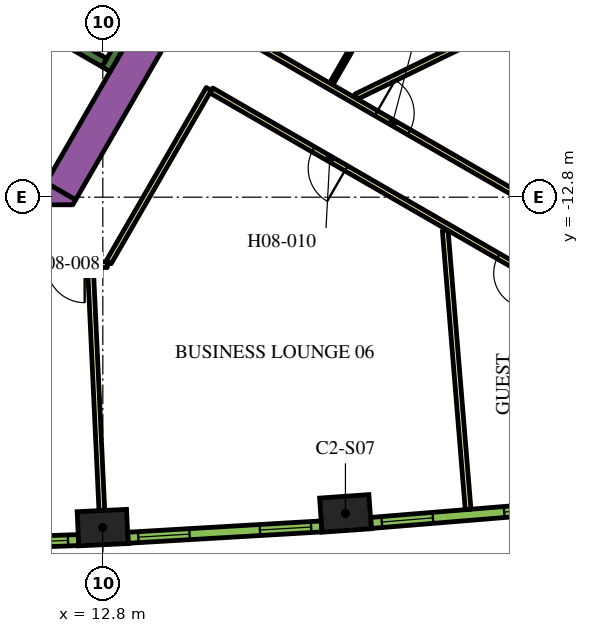
"""IFC4 building model, lengths in metres.
Left out: names, types, materials, properties, quantities, classifications, styles, units other than length and angle.
Written with IfcOpenShell. Run it as: python <this file> out.ifc"""

import sys

from ifc_helpers import new_model, si_unit, direction, frame, frame_2d, origin, origin_2d, place, context, subcontext, project, spatial, polyline, rectangle, outline, extrude, element, fill, save


model = new_model("IFC4")
c1 = context("Model", 3, precision=1e-05, world=origin(), true_north=direction((0.0, 1.0)))
c2 = subcontext(c1, "Body", "Model", "MODEL_VIEW")
j1 = project(units=[si_unit("LENGTHUNIT", "METRE"), si_unit("PLANEANGLEUNIT", "RADIAN")], contexts=[c1])
p1 = place(None, origin())
s1 = spatial("IfcSite", under=j1, at=p1, CompositionType="ELEMENT")
p2 = place(p1, origin())
s2 = spatial("IfcBuilding", under=s1, at=p2, CompositionType="ELEMENT")
p3 = place(p2, frame((0.0, 0.0, 111.0)))
s3 = spatial("IfcBuildingStorey", under=s2, at=p3, CompositionType="ELEMENT", Elevation=111.0)
for number, where, z_axis, x_axis in (
    (1, (12.795, -21.494, 0.0), (0.0, 0.0, 1.0), (0.999, 0.047, 0.0)),
    (2, (19.184, -21.12, 0.0), (0.0, 0.0, 1.0), (0.998, 0.07, 0.0)),
):
    element("IfcColumn", number, at=place(p3, frame(where, z_axis=z_axis, x_axis=x_axis)), inside=s3, PredefinedType="COLUMN", context=c2, shape_type="SweptSolid", body=[
        extrude(rectangle(XDim=1.3, YDim=0.9, at=origin_2d()), origin(), (0.0, 0.0, 1.0), 3.9),
    ])
p4 = place(p3, frame((11.695, -12.644, 0.0), z_axis=(0.0, 0.0, 1.0), x_axis=(0.500010229568, 0.86601949766, 0.0)))
e3 = element("IfcWall", 3, at=p4, inside=s3, PredefinedType="SOLIDWALL", context=c2, shape_type="SweptSolid", body=[
    extrude(rectangle(XDim=9.326, YDim=0.9, at=frame_2d((4.663, 0.0))), origin(), (0.0, 0.0, 1.0), 3.9),
])
p5 = place(p3, origin())
e4 = element("IfcWall", 4, at=p5, inside=s3, PredefinedType="SOLIDWALL", context=c2, shape_type="SweptSolid", body=[
    extrude(outline(polyline([(12.009, -13.0), (11.312, -13.0), (11.312, -12.425), (12.083, -12.871), (12.009, -13.0)])), origin(), (0.0, 0.0, 1.0), 3.9),
])
e5 = element("IfcWall", 5, at=p5, inside=s3, PredefinedType="SOLIDWALL", context=c2, shape_type="SweptSolid", body=[
    extrude(outline(polyline([(11.489, -12.1), (11.312, -12.407), (11.312, -12.1), (11.489, -12.1)])), origin(), (0.0, 0.0, 1.0), 3.9),
])
p6 = place(p3, frame((12.885, -9.431, 0.0), z_axis=(0.0, 0.0, 1.0), x_axis=(0.500020560727, 0.866013532718, 0.0)))
e6 = element("IfcWall", 6, at=p6, inside=s3, PredefinedType="SOLIDWALL", context=c2, shape_type="SweptSolid", body=[
    extrude(rectangle(XDim=3.45, YDim=0.25, at=frame_2d((1.725, 0.0))), origin(), (0.0, 0.0, 1.0), 3.9),
])
p7 = place(p3, frame((12.84, -9.261, 0.0), z_axis=(0.0, 0.0, 1.0), x_axis=(-0.866013990052, 0.500019768644, 0.0)))
e7 = element("IfcWall", 7, at=p7, inside=s3, PredefinedType="SOLIDWALL", context=c2, shape_type="SweptSolid", body=[
    extrude(rectangle(XDim=6.8, YDim=0.25, at=frame_2d((3.4, 0.0))), origin(), (0.0, 0.0, 1.0), 3.9),
])
p8 = place(p3, frame((16.412, -8.523, 0.0), z_axis=(0.0, 0.0, 1.0), x_axis=(0.866025629663, -0.499999608766, 0.0)))
e8 = element("IfcWall", 8, at=p8, inside=s3, PredefinedType="PARTITIONING", context=c2, shape_type="SweptSolid", body=[
    extrude(rectangle(XDim=13.624, YDim=0.15, at=frame_2d((6.812, 0.0))), origin(), (0.0, 0.0, 1.0), 2.75),
])
p9 = place(p8, frame((4.134, 0.0, 0.0)))
e9 = element("IfcOpeningElement", 9, at=p9, cuts=e8, PredefinedType="OPENING", context=c2, shape_type="SweptSolid", body=[
    extrude(rectangle(XDim=1.0, YDim=2.1, at=frame_2d((0.5, 1.05))), frame((0.0, 0.085, 0.0), z_axis=(0.0, -1.0, 0.0), x_axis=(1.0, 0.0, 0.0)), (0.0, 0.0, 1.0), 0.17),
])
p10 = place(p3, frame((12.918, -14.575, 0.0), z_axis=(0.0, 0.0, 1.0), x_axis=(-1.0, 0.0, 0.0)))
e10 = element("IfcWall", 10, at=p10, inside=s3, PredefinedType="PARTITIONING", context=c2, shape_type="SweptSolid", body=[
    extrude(rectangle(XDim=25.766, YDim=0.15, at=frame_2d((12.883, 0.0))), origin(), (0.0, 0.0, 1.0), 2.75),
])
p11 = place(p10, frame((24.586, 0.0, 0.0)))
e11 = element("IfcOpeningElement", 11, at=p11, cuts=e10, PredefinedType="OPENING", context=c2, shape_type="SweptSolid", body=[
    extrude(rectangle(XDim=1.0, YDim=2.1, at=frame_2d((0.5, 1.05))), frame((0.0, 0.085, 0.0), z_axis=(0.0, -1.0, 0.0), x_axis=(1.0, 0.0, 0.0)), (0.0, 0.0, 1.0), 0.17),
])
p12 = place(p10, frame((13.144, 0.0, 0.0)))
e12 = element("IfcOpeningElement", 12, at=p12, cuts=e10, PredefinedType="OPENING", context=c2, shape_type="SweptSolid", body=[
    extrude(rectangle(XDim=1.0, YDim=2.1, at=frame_2d((0.5, 1.05))), frame((0.0, 0.085, 0.0), z_axis=(0.0, -1.0, 0.0), x_axis=(1.0, 0.0, 0.0)), (0.0, 0.0, 1.0), 0.17),
])
p13 = place(p10, frame((10.874, 0.0, 0.0)))
e13 = element("IfcOpeningElement", 13, at=p13, cuts=e10, PredefinedType="OPENING", context=c2, shape_type="SweptSolid", body=[
    extrude(rectangle(XDim=0.9, YDim=2.1, at=frame_2d((0.45, 1.05))), frame((0.0, 0.085, 0.0), z_axis=(0.0, -1.0, 0.0), x_axis=(1.0, 0.0, 0.0)), (0.0, 0.0, 1.0), 0.17),
])
p14 = place(p10, frame((0.596, 0.0, 0.0)))
e14 = element("IfcOpeningElement", 14, at=p14, cuts=e10, PredefinedType="OPENING", context=c2, shape_type="SweptSolid", body=[
    extrude(rectangle(XDim=1.0, YDim=2.1, at=frame_2d((0.5, 1.05))), frame((0.0, 0.085, 0.0), z_axis=(0.0, -1.0, 0.0), x_axis=(1.0, 0.0, 0.0)), (0.0, 0.0, 1.0), 0.17),
])
p15 = place(p3, frame((15.587, -9.952, 0.0), z_axis=(0.0, 0.0, 1.0), x_axis=(-0.500016618951, -0.866015808616, 0.0)))
e15 = element("IfcWall", 15, at=p15, inside=s3, PredefinedType="PARTITIONING", context=c2, shape_type="SweptSolid", body=[
    extrude(rectangle(XDim=5.268, YDim=0.15, at=frame_2d((2.634, 0.0))), origin(), (0.0, 0.0, 1.0), 2.75),
])
p16 = place(p3, frame((27.386, -16.764, 0.0), z_axis=(0.0, 0.0, 1.0), x_axis=(-0.866022585856, 0.500004880763, 0.0)))
e16 = element("IfcWall", 16, at=p16, inside=s3, PredefinedType="PARTITIONING", context=c2, shape_type="SweptSolid", body=[
    extrude(rectangle(XDim=13.544, YDim=0.15, at=frame_2d((6.772, 0.0))), origin(), (0.0, 0.0, 1.0), 2.75),
])
p17 = place(p16, frame((9.447, 0.0, 0.0)))
e17 = element("IfcOpeningElement", 17, at=p17, cuts=e16, PredefinedType="OPENING", context=c2, shape_type="SweptSolid", body=[
    extrude(rectangle(XDim=1.0, YDim=2.1, at=frame_2d((0.5, 1.05))), frame((0.0, 0.085, 0.0), z_axis=(0.0, -1.0, 0.0), x_axis=(1.0, 0.0, 0.0)), (0.0, 0.0, 1.0), 0.17),
])
p18 = place(p16, frame((3.926, 0.0, 0.0)))
e18 = element("IfcOpeningElement", 18, at=p18, cuts=e16, PredefinedType="OPENING", context=c2, shape_type="SweptSolid", body=[
    extrude(rectangle(XDim=0.9, YDim=2.1, at=frame_2d((0.45, 1.05))), frame((0.0, 0.085, 0.0), z_axis=(0.0, -1.0, 0.0), x_axis=(1.0, 0.0, 0.0)), (0.0, 0.0, 1.0), 0.17),
])
p19 = place(p3, frame((12.774, -21.045, 0.0), z_axis=(0.0, 0.0, 1.0), x_axis=(-0.046750341626, 0.998906605023, 0.0)))
e19 = element("IfcWall", 19, at=p19, inside=s3, PredefinedType="PARTITIONING", context=c2, shape_type="SweptSolid", body=[
    extrude(rectangle(XDim=6.392, YDim=0.15, at=frame_2d((3.196, 0.0))), origin(), (0.0, 0.0, 1.0), 2.75),
])
p20 = place(p3, frame((27.478, -6.251, 0.0), z_axis=(0.0, 0.0, 1.0), x_axis=(-0.898940618603, -0.438070501432, 0.0)))
e20 = element("IfcWall", 20, at=p20, inside=s3, PredefinedType="PARTITIONING", context=c2, shape_type="SweptSolid", body=[
    extrude(rectangle(XDim=8.909, YDim=0.15, at=frame_2d((4.455, 0.0))), origin(), (0.0, 0.0, 1.0), 2.75),
])
p21 = place(p3, frame((22.412, -21.016, 0.0), z_axis=(0.0, 0.0, 1.0), x_axis=(-0.081744540534, 0.996653314896, 0.0)))
e21 = element("IfcWall", 21, at=p21, inside=s3, PredefinedType="PARTITIONING", context=c2, shape_type="SweptSolid", body=[
    extrude(rectangle(XDim=7.362, YDim=0.15, at=frame_2d((3.681, 0.0))), origin(), (0.0, 0.0, 1.0), 2.75),
])
p22 = place(p3, frame((19.877, -7.972, 0.0), z_axis=(0.0, 0.0, 1.0), x_axis=(-0.500010206181, -0.866019511163, 0.0)))
e22 = element("IfcWall", 22, at=p22, inside=s3, PredefinedType="PARTITIONING", context=c2, shape_type="SweptSolid", body=[
    extrude(rectangle(XDim=2.13, YDim=0.1, at=frame_2d((1.065, 0.0))), origin(), (0.0, 0.0, 1.0), 2.75),
])
p23 = place(p3, frame((7.059, -22.001, 0.0), z_axis=(0.0, 0.0, 1.0), x_axis=(0.999385993957, 0.035037623812, 0.0)))
e23 = element("IfcWall", 23, at=p23, inside=s3, PredefinedType="SOLIDWALL", context=c2, shape_type="SweptSolid", body=[
    extrude(rectangle(XDim=5.101, YDim=0.29, at=frame_2d((2.55, 0.0))), origin(), (0.0, 0.0, 1.0), 3.65),
])
p24 = place(p23, frame((0.273, 0.0, 0.9)))
e24 = element("IfcOpeningElement", 24, at=p24, cuts=e23, PredefinedType="OPENING", context=c2, shape_type="SweptSolid", body=[
    extrude(rectangle(XDim=1.35, YDim=2.15, at=frame_2d((0.675, 1.075))), frame((0.0, 0.155, 0.0), z_axis=(0.0, -1.0, 0.0), x_axis=(1.0, 0.0, 0.0)), (0.0, 0.0, 1.0), 0.31),
])
p25 = place(p23, frame((3.478, 0.0, 0.9)))
e25 = element("IfcOpeningElement", 25, at=p25, cuts=e23, PredefinedType="OPENING", context=c2, shape_type="SweptSolid", body=[
    extrude(rectangle(XDim=1.35, YDim=2.15, at=frame_2d((0.675, 1.075))), frame((0.0, 0.155, 0.0), z_axis=(0.0, -1.0, 0.0), x_axis=(1.0, 0.0, 0.0)), (0.0, 0.0, 1.0), 0.31),
])
p26 = place(p3, frame((13.462, -21.761, 0.0), z_axis=(0.0, 0.0, 1.0), x_axis=(0.998290511436, 0.058447025388, 0.0)))
e26 = element("IfcWall", 26, at=p26, inside=s3, PredefinedType="SOLIDWALL", context=c2, shape_type="SweptSolid", body=[
    extrude(rectangle(XDim=5.1, YDim=0.29, at=frame_2d((2.55, 0.0))), origin(), (0.0, 0.0, 1.0), 3.65),
])
p27 = place(p26, frame((0.272, 0.0, 0.9)))
e27 = element("IfcOpeningElement", 27, at=p27, cuts=e26, PredefinedType="OPENING", context=c2, shape_type="SweptSolid", body=[
    extrude(rectangle(XDim=1.35, YDim=2.15, at=frame_2d((0.675, 1.075))), frame((0.0, 0.155, 0.0), z_axis=(0.0, -1.0, 0.0), x_axis=(1.0, 0.0, 0.0)), (0.0, 0.0, 1.0), 0.31),
])
p28 = place(p26, frame((3.478, 0.0, 0.9)))
e28 = element("IfcOpeningElement", 28, at=p28, cuts=e26, PredefinedType="OPENING", context=c2, shape_type="SweptSolid", body=[
    extrude(rectangle(XDim=1.35, YDim=2.15, at=frame_2d((0.675, 1.075))), frame((0.0, 0.155, 0.0), z_axis=(0.0, -1.0, 0.0), x_axis=(1.0, 0.0, 0.0)), (0.0, 0.0, 1.0), 0.31),
])
p29 = place(p3, frame((19.857, -21.371, 0.0), z_axis=(0.0, 0.0, 1.0), x_axis=(0.99665273362, 0.081751627308, 0.0)))
e29 = element("IfcWall", 29, at=p29, inside=s3, PredefinedType="SOLIDWALL", context=c2, shape_type="SweptSolid", body=[
    extrude(rectangle(XDim=5.107, YDim=0.29, at=frame_2d((2.553, 0.0))), origin(), (0.0, 0.0, 1.0), 3.65),
])
p30 = place(p29, frame((0.285, 0.0, 0.9)))
e30 = element("IfcOpeningElement", 30, at=p30, cuts=e29, PredefinedType="OPENING", context=c2, shape_type="SweptSolid", body=[
    extrude(rectangle(XDim=1.35, YDim=2.15, at=frame_2d((0.675, 1.075))), frame((0.0, 0.155, 0.0), z_axis=(0.0, -1.0, 0.0), x_axis=(1.0, 0.0, 0.0)), (0.0, 0.0, 1.0), 0.31),
])
p31 = place(p29, frame((3.516, 0.0, 0.9)))
e31 = element("IfcOpeningElement", 31, at=p31, cuts=e29, PredefinedType="OPENING", context=c2, shape_type="SweptSolid", body=[
    extrude(rectangle(XDim=1.35, YDim=2.15, at=frame_2d((0.675, 1.075))), frame((0.0, 0.155, 0.0), z_axis=(0.0, -1.0, 0.0), x_axis=(1.0, 0.0, 0.0)), (0.0, 0.0, 1.0), 0.31),
])
p32 = place(p14, origin())
e32 = element("IfcDoor", 32, at=p32, inside=s3, OperationType="SINGLE_SWING_LEFT", PredefinedType="DOOR", context=c2, shape_type="SweptSolid", body=[
    extrude(rectangle(XDim=1.0, YDim=2.1, at=frame_2d((0.5, 1.05))), frame((0.0, 0.025, 0.0), z_axis=(0.0, -1.0, 0.0), x_axis=(1.0, 0.0, 0.0)), (0.0, 0.0, 1.0), 0.05),
])
fill(e14, e32)
p33 = place(p17, origin())
e33 = element("IfcDoor", 33, at=p33, inside=s3, OperationType="SINGLE_SWING_RIGHT", PredefinedType="DOOR", context=c2, shape_type="SweptSolid", body=[
    extrude(rectangle(XDim=1.0, YDim=2.1, at=frame_2d((0.5, 1.05))), frame((0.0, 0.025, 0.0), z_axis=(0.0, -1.0, 0.0), x_axis=(1.0, 0.0, 0.0)), (0.0, 0.0, 1.0), 0.05),
])
fill(e17, e33)
p34 = place(p18, origin())
e34 = element("IfcDoor", 34, at=p34, inside=s3, OperationType="SINGLE_SWING_LEFT", PredefinedType="DOOR", context=c2, shape_type="SweptSolid", body=[
    extrude(rectangle(XDim=0.9, YDim=2.1, at=frame_2d((0.45, 1.05))), frame((0.0, 0.025, 0.0), z_axis=(0.0, -1.0, 0.0), x_axis=(1.0, 0.0, 0.0)), (0.0, 0.0, 1.0), 0.05),
])
fill(e18, e34)
p35 = place(p9, origin())
e35 = element("IfcDoor", 35, at=p35, inside=s3, OperationType="SINGLE_SWING_LEFT", PredefinedType="DOOR", context=c2, shape_type="SweptSolid", body=[
    extrude(rectangle(XDim=1.0, YDim=2.1, at=frame_2d((0.5, 1.05))), frame((0.0, 0.025, 0.0), z_axis=(0.0, -1.0, 0.0), x_axis=(1.0, 0.0, 0.0)), (0.0, 0.0, 1.0), 0.05),
])
fill(e9, e35)
p36 = place(p25, origin())
e36 = element("IfcWindow", 36, at=p36, inside=s3, PartitioningType="DOUBLE_PANEL_VERTICAL", PredefinedType="WINDOW", context=c2, shape_type="SweptSolid", body=[
    extrude(rectangle(XDim=1.35, YDim=2.15, at=frame_2d((0.675, 1.075))), frame((0.0, 0.015, 0.0), z_axis=(0.0, -1.0, 0.0), x_axis=(1.0, 0.0, 0.0)), (0.0, 0.0, 1.0), 0.06),
])
fill(e25, e36)
p37 = place(p27, origin())
e37 = element("IfcWindow", 37, at=p37, inside=s3, PartitioningType="DOUBLE_PANEL_VERTICAL", PredefinedType="WINDOW", context=c2, shape_type="SweptSolid", body=[
    extrude(rectangle(XDim=1.35, YDim=2.15, at=frame_2d((0.675, 1.075))), frame((0.0, 0.015, 0.0), z_axis=(0.0, -1.0, 0.0), x_axis=(1.0, 0.0, 0.0)), (0.0, 0.0, 1.0), 0.06),
])
fill(e27, e37)
p38 = place(p28, origin())
e38 = element("IfcWindow", 38, at=p38, inside=s3, PartitioningType="DOUBLE_PANEL_VERTICAL", PredefinedType="WINDOW", context=c2, shape_type="SweptSolid", body=[
    extrude(rectangle(XDim=1.35, YDim=2.15, at=frame_2d((0.675, 1.075))), frame((0.0, 0.015, 0.0), z_axis=(0.0, -1.0, 0.0), x_axis=(1.0, 0.0, 0.0)), (0.0, 0.0, 1.0), 0.06),
])
fill(e28, e38)
p39 = place(p30, origin())
e39 = element("IfcWindow", 39, at=p39, inside=s3, PartitioningType="DOUBLE_PANEL_VERTICAL", PredefinedType="WINDOW", context=c2, shape_type="SweptSolid", body=[
    extrude(rectangle(XDim=1.35, YDim=2.15, at=frame_2d((0.675, 1.075))), frame((0.0, 0.015, 0.0), z_axis=(0.0, -1.0, 0.0), x_axis=(1.0, 0.0, 0.0)), (0.0, 0.0, 1.0), 0.06),
])
fill(e30, e39)
p40 = place(p31, origin())
e40 = element("IfcWindow", 40, at=p40, inside=s3, PartitioningType="DOUBLE_PANEL_VERTICAL", PredefinedType="WINDOW", context=c2, shape_type="SweptSolid", body=[
    extrude(rectangle(XDim=1.35, YDim=2.15, at=frame_2d((0.675, 1.075))), frame((0.0, 0.015, 0.0), z_axis=(0.0, -1.0, 0.0), x_axis=(1.0, 0.0, 0.0)), (0.0, 0.0, 1.0), 0.06),
])
fill(e31, e40)
save(model, sys.argv[1])
